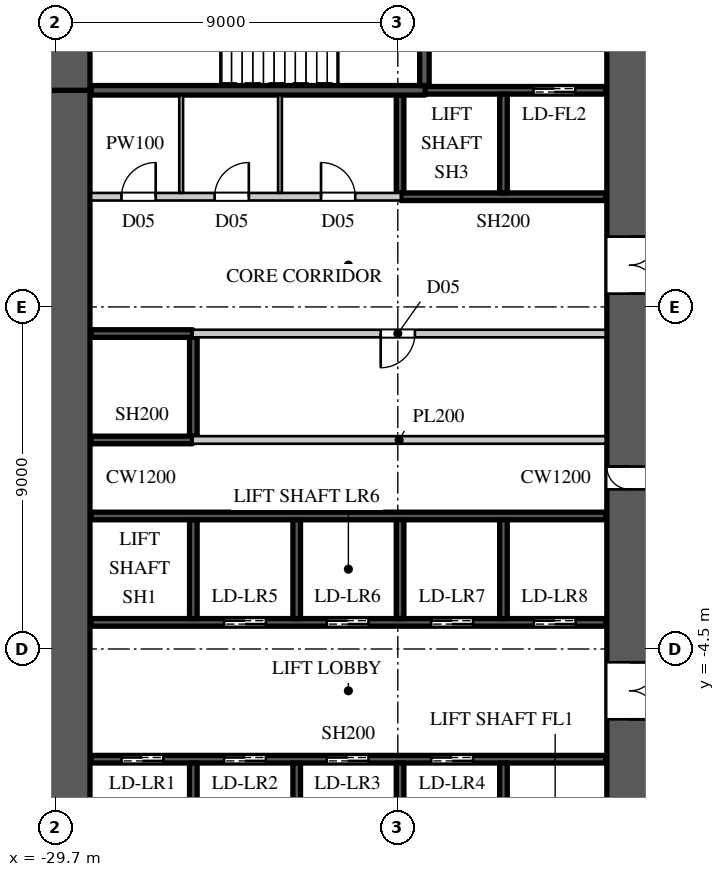
"""IFC4 building model, lengths in metres.
Left out: names, types, materials, properties, quantities, classifications, styles, units other than length and angle.
Written with IfcOpenShell. Run it as: python <this file> out.ifc"""

import sys

from ifc_helpers import new_model, si_unit, direction, frame, frame_2d, origin, place, context, subcontext, project, spatial, rectangle, extrude, element, fill, save


model = new_model("IFC4")
c1 = context("Model", 3, precision=1e-05, world=origin(), true_north=direction((0.0, 1.0)))
c2 = subcontext(c1, "Body", "Model", "MODEL_VIEW")
j1 = project(units=[si_unit("LENGTHUNIT", "METRE"), si_unit("PLANEANGLEUNIT", "RADIAN")], contexts=[c1])
p1 = place(None, origin())
s1 = spatial("IfcSite", under=j1, at=p1, CompositionType="ELEMENT")
p2 = place(p1, origin())
s2 = spatial("IfcBuilding", under=s1, at=p2, CompositionType="ELEMENT")
p3 = place(p2, frame((0.0, 0.0, 36.0)))
s3 = spatial("IfcBuildingStorey", under=s2, at=p3, CompositionType="ELEMENT", Elevation=36.0)
p4 = place(p3, frame((-14.6, -14.8, 0.0), z_axis=(0.0, 0.0, 1.0), x_axis=(0.0, 1.0, 0.0)))
e1 = element("IfcWall", 1, at=p4, inside=s3, PredefinedType="SHEAR", context=c2, shape_type="SweptSolid", body=[
    extrude(rectangle(XDim=29.6, YDim=1.2, at=frame_2d((14.8, 0.0))), origin(), (0.0, 0.0, 1.0), 8.0),
])
p5 = place(p4, frame((1.55, 0.0, 0.0)))
e2 = element("IfcOpeningElement", 2, at=p5, cuts=e1, PredefinedType="OPENING", context=c2, shape_type="SweptSolid", body=[
    extrude(rectangle(XDim=1.5, YDim=2.4, at=frame_2d((0.75, 1.2))), frame((0.0, 0.61, 0.0), z_axis=(0.0, -1.0, 0.0), x_axis=(1.0, 0.0, 0.0)), (0.0, 0.0, 1.0), 1.22),
])
p6 = place(p4, frame((26.55, 0.0, 0.0)))
e3 = element("IfcOpeningElement", 3, at=p6, cuts=e1, PredefinedType="OPENING", context=c2, shape_type="SweptSolid", body=[
    extrude(rectangle(XDim=1.5, YDim=2.4, at=frame_2d((0.75, 1.2))), frame((0.0, 0.61, 0.0), z_axis=(0.0, -1.0, 0.0), x_axis=(1.0, 0.0, 0.0)), (0.0, 0.0, 1.0), 1.22),
])
p7 = place(p4, frame((8.45, 0.0, 0.0)))
e4 = element("IfcOpeningElement", 4, at=p7, cuts=e1, PredefinedType="OPENING", context=c2, shape_type="SweptSolid", body=[
    extrude(rectangle(XDim=1.5, YDim=2.4, at=frame_2d((0.75, 1.2))), frame((0.0, 0.61, 0.0), z_axis=(0.0, -1.0, 0.0), x_axis=(1.0, 0.0, 0.0)), (0.0, 0.0, 1.0), 1.22),
])
p8 = place(p4, frame((19.65, 0.0, 0.0)))
e5 = element("IfcOpeningElement", 5, at=p8, cuts=e1, PredefinedType="OPENING", context=c2, shape_type="SweptSolid", body=[
    extrude(rectangle(XDim=1.5, YDim=2.4, at=frame_2d((0.75, 1.2))), frame((0.0, 0.61, 0.0), z_axis=(0.0, -1.0, 0.0), x_axis=(1.0, 0.0, 0.0)), (0.0, 0.0, 1.0), 1.22),
])
p9 = place(p4, frame((14.5, 0.0, 0.0)))
e6 = element("IfcOpeningElement", 6, at=p9, cuts=e1, PredefinedType="OPENING", context=c2, shape_type="SweptSolid", body=[
    extrude(rectangle(XDim=0.6, YDim=2.0, at=frame_2d((0.3, 1.0))), frame((0.0, 0.61, 0.0), z_axis=(0.0, -1.0, 0.0), x_axis=(1.0, 0.0, 0.0)), (0.0, 0.0, 1.0), 1.22),
])
p10 = place(p3, frame((-29.4, -10.2, 0.0), z_axis=(0.0, 0.0, 1.0), x_axis=(0.0, 1.0, 0.0)))
e7 = element("IfcWall", 7, at=p10, inside=s3, PredefinedType="SHEAR", context=c2, shape_type="SweptSolid", body=[
    extrude(rectangle(XDim=20.4, YDim=1.2, at=frame_2d((10.2, 0.0))), origin(), (0.0, 0.0, 1.0), 8.0),
])
p11 = place(p3, frame((-29.4, 10.2, 0.0), z_axis=(0.0, 0.0, 1.0), x_axis=(0.0, 1.0, 0.0)))
e8 = element("IfcWall", 8, at=p11, inside=s3, PredefinedType="SHEAR", context=c2, shape_type="SweptSolid", body=[
    extrude(rectangle(XDim=4.6, YDim=1.2, at=frame_2d((2.3, 0.0))), origin(), (0.0, 0.0, 1.0), 8.0),
])
p12 = place(p3, frame((-28.77, 7.4, 0.0), z_axis=(0.0, 0.0, 1.0), x_axis=(1.0, 0.0, 0.0)))
e9 = element("IfcWall", 9, at=p12, inside=s3, PredefinedType="PARTITIONING", context=c2, shape_type="SweptSolid", body=[
    extrude(rectangle(XDim=8.15, YDim=0.2, at=frame_2d((4.075, 0.0))), origin(), (0.0, 0.0, 1.0), 7.598),
])
p13 = place(p12, frame((0.8, 0.0, 0.0)))
e10 = element("IfcOpeningElement", 10, at=p13, cuts=e9, PredefinedType="OPENING", context=c2, shape_type="SweptSolid", body=[
    extrude(rectangle(XDim=0.9, YDim=2.2, at=frame_2d((0.45, 1.1))), frame((0.0, 0.11, 0.0), z_axis=(0.0, -1.0, 0.0), x_axis=(1.0, 0.0, 0.0)), (0.0, 0.0, 1.0), 0.22),
])
p14 = place(p12, frame((3.25, 0.0, 0.0)))
e11 = element("IfcOpeningElement", 11, at=p14, cuts=e9, PredefinedType="OPENING", context=c2, shape_type="SweptSolid", body=[
    extrude(rectangle(XDim=0.9, YDim=2.2, at=frame_2d((0.45, 1.1))), frame((0.0, 0.11, 0.0), z_axis=(0.0, -1.0, 0.0), x_axis=(1.0, 0.0, 0.0)), (0.0, 0.0, 1.0), 0.22),
])
p15 = place(p12, frame((6.05, 0.0, 0.0)))
e12 = element("IfcOpeningElement", 12, at=p15, cuts=e9, PredefinedType="OPENING", context=c2, shape_type="SweptSolid", body=[
    extrude(rectangle(XDim=0.9, YDim=2.2, at=frame_2d((0.45, 1.1))), frame((0.0, 0.11, 0.0), z_axis=(0.0, -1.0, 0.0), x_axis=(1.0, 0.0, 0.0)), (0.0, 0.0, 1.0), 0.22),
])
p16 = place(p3, frame((-26.1, 3.8, 0.0), z_axis=(0.0, 0.0, 1.0), x_axis=(1.0, 0.0, 0.0)))
e13 = element("IfcWall", 13, at=p16, inside=s3, PredefinedType="PARTITIONING", context=c2, shape_type="SweptSolid", body=[
    extrude(rectangle(XDim=10.87, YDim=0.2, at=frame_2d((5.435, 0.0))), origin(), (0.0, 0.0, 1.0), 7.598),
])
p17 = place(p16, frame((4.95, 0.0, 0.0)))
e14 = element("IfcOpeningElement", 14, at=p17, cuts=e13, PredefinedType="OPENING", context=c2, shape_type="SweptSolid", body=[
    extrude(rectangle(XDim=0.9, YDim=2.2, at=frame_2d((0.45, 1.1))), frame((0.0, 0.11, 0.0), z_axis=(0.0, -1.0, 0.0), x_axis=(1.0, 0.0, 0.0)), (0.0, 0.0, 1.0), 0.22),
])
p18 = place(p3, frame((-26.1, 1.0, 0.0), z_axis=(0.0, 0.0, 1.0), x_axis=(1.0, 0.0, 0.0)))
e15 = element("IfcWall", 15, at=p18, inside=s3, PredefinedType="PARTITIONING", context=c2, shape_type="SweptSolid", body=[
    extrude(rectangle(XDim=10.87, YDim=0.2, at=frame_2d((5.435, 0.0))), origin(), (0.0, 0.0, 1.0), 7.598),
])
p19 = place(p3, frame((-28.77, -7.4, 0.0), z_axis=(0.0, 0.0, 1.0), x_axis=(1.0, 0.0, 0.0)))
e16 = element("IfcWall", 16, at=p19, inside=s3, PredefinedType="SHEAR", context=c2, shape_type="SweptSolid", body=[
    extrude(rectangle(XDim=13.54, YDim=0.2, at=frame_2d((6.77, 0.0))), origin(), (0.0, 0.0, 1.0), 7.598),
])
p20 = place(p19, frame((0.8, 0.0, 0.0)))
e17 = element("IfcOpeningElement", 17, at=p20, cuts=e16, PredefinedType="OPENING", context=c2, shape_type="SweptSolid", body=[
    extrude(rectangle(XDim=1.1, YDim=2.2, at=frame_2d((0.55, 1.1))), frame((0.0, 0.11, 0.0), z_axis=(0.0, -1.0, 0.0), x_axis=(1.0, 0.0, 0.0)), (0.0, 0.0, 1.0), 0.22),
])
p21 = place(p19, frame((3.5, 0.0, 0.0)))
e18 = element("IfcOpeningElement", 18, at=p21, cuts=e16, PredefinedType="OPENING", context=c2, shape_type="SweptSolid", body=[
    extrude(rectangle(XDim=1.1, YDim=2.2, at=frame_2d((0.55, 1.1))), frame((0.0, 0.11, 0.0), z_axis=(0.0, -1.0, 0.0), x_axis=(1.0, 0.0, 0.0)), (0.0, 0.0, 1.0), 0.22),
])
p22 = place(p19, frame((6.2, 0.0, 0.0)))
e19 = element("IfcOpeningElement", 19, at=p22, cuts=e16, PredefinedType="OPENING", context=c2, shape_type="SweptSolid", body=[
    extrude(rectangle(XDim=1.1, YDim=2.2, at=frame_2d((0.55, 1.1))), frame((0.0, 0.11, 0.0), z_axis=(0.0, -1.0, 0.0), x_axis=(1.0, 0.0, 0.0)), (0.0, 0.0, 1.0), 0.22),
])
p23 = place(p19, frame((8.95, 0.0, 0.0)))
e20 = element("IfcOpeningElement", 20, at=p23, cuts=e16, PredefinedType="OPENING", context=c2, shape_type="SweptSolid", body=[
    extrude(rectangle(XDim=1.1, YDim=2.2, at=frame_2d((0.55, 1.1))), frame((0.0, 0.11, 0.0), z_axis=(0.0, -1.0, 0.0), x_axis=(1.0, 0.0, 0.0)), (0.0, 0.0, 1.0), 0.22),
])
p24 = place(p3, frame((-28.77, -3.8, 0.0), z_axis=(0.0, 0.0, 1.0), x_axis=(1.0, 0.0, 0.0)))
e21 = element("IfcWall", 21, at=p24, inside=s3, PredefinedType="SHEAR", context=c2, shape_type="SweptSolid", body=[
    extrude(rectangle(XDim=13.54, YDim=0.2, at=frame_2d((6.77, 0.0))), origin(), (0.0, 0.0, 1.0), 7.598),
])
p25 = place(p24, frame((3.5, 0.0, 0.0)))
e22 = element("IfcOpeningElement", 22, at=p25, cuts=e21, PredefinedType="OPENING", context=c2, shape_type="SweptSolid", body=[
    extrude(rectangle(XDim=1.1, YDim=2.2, at=frame_2d((0.55, 1.1))), frame((0.0, 0.11, 0.0), z_axis=(0.0, -1.0, 0.0), x_axis=(1.0, 0.0, 0.0)), (0.0, 0.0, 1.0), 0.22),
])
p26 = place(p24, frame((6.2, 0.0, 0.0)))
e23 = element("IfcOpeningElement", 23, at=p26, cuts=e21, PredefinedType="OPENING", context=c2, shape_type="SweptSolid", body=[
    extrude(rectangle(XDim=1.1, YDim=2.2, at=frame_2d((0.55, 1.1))), frame((0.0, 0.11, 0.0), z_axis=(0.0, -1.0, 0.0), x_axis=(1.0, 0.0, 0.0)), (0.0, 0.0, 1.0), 0.22),
])
p27 = place(p24, frame((8.95, 0.0, 0.0)))
e24 = element("IfcOpeningElement", 24, at=p27, cuts=e21, PredefinedType="OPENING", context=c2, shape_type="SweptSolid", body=[
    extrude(rectangle(XDim=1.1, YDim=2.2, at=frame_2d((0.55, 1.1))), frame((0.0, 0.11, 0.0), z_axis=(0.0, -1.0, 0.0), x_axis=(1.0, 0.0, 0.0)), (0.0, 0.0, 1.0), 0.22),
])
p28 = place(p24, frame((11.65, 0.0, 0.0)))
e25 = element("IfcOpeningElement", 25, at=p28, cuts=e21, PredefinedType="OPENING", context=c2, shape_type="SweptSolid", body=[
    extrude(rectangle(XDim=1.1, YDim=2.2, at=frame_2d((0.55, 1.1))), frame((0.0, 0.11, 0.0), z_axis=(0.0, -1.0, 0.0), x_axis=(1.0, 0.0, 0.0)), (0.0, 0.0, 1.0), 0.22),
])
p29 = place(p3, frame((-28.77, -1.0, 0.0), z_axis=(0.0, 0.0, 1.0), x_axis=(1.0, 0.0, 0.0)))
e26 = element("IfcWall", 26, at=p29, inside=s3, PredefinedType="SHEAR", context=c2, shape_type="SweptSolid", body=[
    extrude(rectangle(XDim=13.54, YDim=0.2, at=frame_2d((6.77, 0.0))), origin(), (0.0, 0.0, 1.0), 7.598),
])
for number, where, z_axis, x_axis in (
    (27, (-28.77, 1.0, 0.0), (0.0, 0.0, 1.0), (1.0, 0.0, 0.0)),
    (28, (-28.77, 3.8, 0.0), (0.0, 0.0, 1.0), (1.0, 0.0, 0.0)),
):
    element("IfcWall", number, at=place(p3, frame(where, z_axis=z_axis, x_axis=x_axis)), inside=s3, PredefinedType="SHEAR", context=c2, shape_type="SweptSolid", body=[
        extrude(rectangle(XDim=2.67, YDim=0.2, at=frame_2d((1.335, 0.0))), origin(), (0.0, 0.0, 1.0), 7.598),
    ])
p30 = place(p3, frame((-26.08, -10.075, 0.0), z_axis=(0.0, 0.0, 1.0), x_axis=(0.0, 1.0, 0.0)))
e29 = element("IfcWall", 29, at=p30, inside=s3, PredefinedType="SHEAR", context=c2, shape_type="SweptSolid", body=[
    extrude(rectangle(XDim=2.575, YDim=0.2, at=frame_2d((1.288, 0.0))), origin(), (0.0, 0.0, 1.0), 8.0),
])
p31 = place(p3, frame((-26.08, -3.7, 0.0), z_axis=(0.0, 0.0, 1.0), x_axis=(0.0, 1.0, 0.0)))
e30 = element("IfcWall", 30, at=p31, inside=s3, PredefinedType="SHEAR", context=c2, shape_type="SweptSolid", body=[
    extrude(rectangle(XDim=2.6, YDim=0.2, at=frame_2d((1.3, 0.0))), origin(), (0.0, 0.0, 1.0), 8.0),
])
p32 = place(p3, frame((-26.08, 1.1, 0.0), z_axis=(0.0, 0.0, 1.0), x_axis=(0.0, 1.0, 0.0)))
e31 = element("IfcWall", 31, at=p32, inside=s3, PredefinedType="SHEAR", context=c2, shape_type="SweptSolid", body=[
    extrude(rectangle(XDim=2.6, YDim=0.2, at=frame_2d((1.3, 0.0))), origin(), (0.0, 0.0, 1.0), 7.598),
])
p33 = place(p3, frame((-23.36, -10.075, 0.0), z_axis=(0.0, 0.0, 1.0), x_axis=(0.0, 1.0, 0.0)))
e32 = element("IfcWall", 32, at=p33, inside=s3, PredefinedType="SHEAR", context=c2, shape_type="SweptSolid", body=[
    extrude(rectangle(XDim=2.575, YDim=0.2, at=frame_2d((1.288, 0.0))), origin(), (0.0, 0.0, 1.0), 8.0),
])
p34 = place(p3, frame((-23.36, -3.7, 0.0), z_axis=(0.0, 0.0, 1.0), x_axis=(0.0, 1.0, 0.0)))
e33 = element("IfcWall", 33, at=p34, inside=s3, PredefinedType="SHEAR", context=c2, shape_type="SweptSolid", body=[
    extrude(rectangle(XDim=2.6, YDim=0.2, at=frame_2d((1.3, 0.0))), origin(), (0.0, 0.0, 1.0), 8.0),
])
p35 = place(p3, frame((-20.64, -10.075, 0.0), z_axis=(0.0, 0.0, 1.0), x_axis=(0.0, 1.0, 0.0)))
e34 = element("IfcWall", 34, at=p35, inside=s3, PredefinedType="SHEAR", context=c2, shape_type="SweptSolid", body=[
    extrude(rectangle(XDim=2.575, YDim=0.2, at=frame_2d((1.288, 0.0))), origin(), (0.0, 0.0, 1.0), 8.0),
])
p36 = place(p3, frame((-20.64, -3.7, 0.0), z_axis=(0.0, 0.0, 1.0), x_axis=(0.0, 1.0, 0.0)))
e35 = element("IfcWall", 35, at=p36, inside=s3, PredefinedType="SHEAR", context=c2, shape_type="SweptSolid", body=[
    extrude(rectangle(XDim=2.6, YDim=0.2, at=frame_2d((1.3, 0.0))), origin(), (0.0, 0.0, 1.0), 8.0),
])
p37 = place(p3, frame((-20.64, 7.5, 0.0), z_axis=(0.0, 0.0, 1.0), x_axis=(0.0, 1.0, 0.0)))
e36 = element("IfcWall", 36, at=p37, inside=s3, PredefinedType="SHEAR", context=c2, shape_type="SweptSolid", body=[
    extrude(rectangle(XDim=2.575, YDim=0.2, at=frame_2d((1.288, 0.0))), origin(), (0.0, 0.0, 1.0), 7.598),
])
p38 = place(p3, frame((-20.62, 7.4, 0.0), z_axis=(0.0, 0.0, 1.0), x_axis=(1.0, 0.0, 0.0)))
e37 = element("IfcWall", 37, at=p38, inside=s3, PredefinedType="SHEAR", context=c2, shape_type="SweptSolid", body=[
    extrude(rectangle(XDim=5.39, YDim=0.2, at=frame_2d((2.695, 0.0))), origin(), (0.0, 0.0, 1.0), 7.598),
])
p39 = place(p3, frame((-19.98, 10.2, 0.0), z_axis=(0.0, 0.0, 1.0), x_axis=(1.0, 0.0, 0.0)))
e38 = element("IfcWall", 38, at=p39, inside=s3, PredefinedType="SHEAR", context=c2, shape_type="SweptSolid", body=[
    extrude(rectangle(XDim=4.75, YDim=0.2, at=frame_2d((2.375, 0.0))), origin(), (0.0, 0.0, 1.0), 7.598),
])
p40 = place(p39, frame((2.85, 0.0, 0.0)))
e39 = element("IfcOpeningElement", 39, at=p40, cuts=e38, PredefinedType="OPENING", context=c2, shape_type="SweptSolid", body=[
    extrude(rectangle(XDim=1.1, YDim=2.2, at=frame_2d((0.55, 1.1))), frame((0.0, 0.11, 0.0), z_axis=(0.0, -1.0, 0.0), x_axis=(1.0, 0.0, 0.0)), (0.0, 0.0, 1.0), 0.22),
])
p41 = place(p3, frame((-17.92, -10.1, 0.0), z_axis=(0.0, 0.0, 1.0), x_axis=(0.0, 1.0, 0.0)))
e40 = element("IfcWall", 40, at=p41, inside=s3, PredefinedType="SHEAR", context=c2, shape_type="SweptSolid", body=[
    extrude(rectangle(XDim=2.6, YDim=0.2, at=frame_2d((1.3, 0.0))), origin(), (0.0, 0.0, 1.0), 8.0),
])
p42 = place(p3, frame((-17.92, -3.7, 0.0), z_axis=(0.0, 0.0, 1.0), x_axis=(0.0, 1.0, 0.0)))
e41 = element("IfcWall", 41, at=p42, inside=s3, PredefinedType="SHEAR", context=c2, shape_type="SweptSolid", body=[
    extrude(rectangle(XDim=2.6, YDim=0.2, at=frame_2d((1.3, 0.0))), origin(), (0.0, 0.0, 1.0), 8.0),
])
p43 = place(p3, frame((-17.92, 7.5, 0.0), z_axis=(0.0, 0.0, 1.0), x_axis=(0.0, 1.0, 0.0)))
e42 = element("IfcWall", 42, at=p43, inside=s3, PredefinedType="SHEAR", context=c2, shape_type="SweptSolid", body=[
    extrude(rectangle(XDim=2.6, YDim=0.2, at=frame_2d((1.3, 0.0))), origin(), (0.0, 0.0, 1.0), 8.0),
])
p44 = place(p3, frame((-28.77, 10.2, 0.0), z_axis=(0.0, 0.0, 1.0), x_axis=(1.0, 0.0, 0.0)))
e43 = element("IfcWall", 43, at=p44, inside=s3, PredefinedType="SHEAR", context=c2, shape_type="SweptSolid", body=[
    extrude(rectangle(XDim=8.79, YDim=0.25, at=frame_2d((4.395, 0.0))), origin(), (0.0, 0.0, 1.0), 7.598),
])
p45 = place(p3, frame((-20.0, 10.325, 0.0), z_axis=(0.0, 0.0, 1.0), x_axis=(0.0, 1.0, 0.0)))
e44 = element("IfcWall", 44, at=p45, inside=s3, PredefinedType="SHEAR", context=c2, shape_type="SweptSolid", body=[
    extrude(rectangle(XDim=4.445, YDim=0.25, at=frame_2d((2.223, 0.0))), origin(), (0.0, 0.0, 1.0), 7.598),
])
p46 = place(p45, frame((1.65, 0.0, 0.0)))
e45 = element("IfcOpeningElement", 45, at=p46, cuts=e44, PredefinedType="OPENING", context=c2, shape_type="SweptSolid", body=[
    extrude(rectangle(XDim=1.1, YDim=2.2, at=frame_2d((0.55, 1.1))), frame((0.0, 0.135, 0.0), z_axis=(0.0, -1.0, 0.0), x_axis=(1.0, 0.0, 0.0)), (0.0, 0.0, 1.0), 0.27),
])
for number, where, z_axis, x_axis in (
    (46, (-26.4, 7.5, 0.0), (0.0, 0.0, 1.0), (0.0, 1.0, 0.0)),
    (47, (-23.8, 7.5, 0.0), (0.0, 0.0, 1.0), (0.0, 1.0, 0.0)),
):
    element("IfcWall", number, at=place(p3, frame(where, z_axis=z_axis, x_axis=x_axis)), inside=s3, PredefinedType="PARTITIONING", context=c2, shape_type="SweptSolid", body=[
        extrude(rectangle(XDim=2.575, YDim=0.1, at=frame_2d((1.288, 0.0))), origin(), (0.0, 0.0, 1.0), 7.598),
    ])
p47 = place(p17, origin())
e48 = element("IfcDoor", 48, at=p47, inside=s3, OperationType="SINGLE_SWING_RIGHT", PredefinedType="DOOR", context=c2, shape_type="SweptSolid", body=[
    extrude(rectangle(XDim=0.9, YDim=2.2, at=frame_2d((0.45, 1.1))), frame((0.0, 0.025, 0.0), z_axis=(0.0, -1.0, 0.0), x_axis=(1.0, 0.0, 0.0)), (0.0, 0.0, 1.0), 0.05),
])
fill(e14, e48)
p48 = place(p13, origin())
e49 = element("IfcDoor", 49, at=p48, inside=s3, OperationType="SINGLE_SWING_RIGHT", PredefinedType="DOOR", context=c2, shape_type="SweptSolid", body=[
    extrude(rectangle(XDim=0.9, YDim=2.2, at=frame_2d((0.45, 1.1))), frame((0.0, 0.025, 0.0), z_axis=(0.0, -1.0, 0.0), x_axis=(1.0, 0.0, 0.0)), (0.0, 0.0, 1.0), 0.05),
])
fill(e10, e49)
p49 = place(p14, origin())
e50 = element("IfcDoor", 50, at=p49, inside=s3, OperationType="SINGLE_SWING_RIGHT", PredefinedType="DOOR", context=c2, shape_type="SweptSolid", body=[
    extrude(rectangle(XDim=0.9, YDim=2.2, at=frame_2d((0.45, 1.1))), frame((0.0, 0.025, 0.0), z_axis=(0.0, -1.0, 0.0), x_axis=(1.0, 0.0, 0.0)), (0.0, 0.0, 1.0), 0.05),
])
fill(e11, e50)
p50 = place(p15, origin())
e51 = element("IfcDoor", 51, at=p50, inside=s3, OperationType="SINGLE_SWING_LEFT", PredefinedType="DOOR", context=c2, shape_type="SweptSolid", body=[
    extrude(rectangle(XDim=0.9, YDim=2.2, at=frame_2d((0.45, 1.1))), frame((0.0, 0.025, 0.0), z_axis=(0.0, -1.0, 0.0), x_axis=(1.0, 0.0, 0.0)), (0.0, 0.0, 1.0), 0.05),
])
fill(e12, e51)
p51 = place(p20, origin())
e52 = element("IfcDoor", 52, at=p51, inside=s3, OperationType="DOUBLE_DOOR_SLIDING", PredefinedType="DOOR", context=c2, shape_type="SweptSolid", body=[
    extrude(rectangle(XDim=1.1, YDim=2.2, at=frame_2d((0.55, 1.1))), frame((0.0, 0.025, 0.0), z_axis=(0.0, -1.0, 0.0), x_axis=(1.0, 0.0, 0.0)), (0.0, 0.0, 1.0), 0.05),
])
fill(e17, e52)
p52 = place(p21, origin())
e53 = element("IfcDoor", 53, at=p52, inside=s3, OperationType="DOUBLE_DOOR_SLIDING", PredefinedType="DOOR", context=c2, shape_type="SweptSolid", body=[
    extrude(rectangle(XDim=1.1, YDim=2.2, at=frame_2d((0.55, 1.1))), frame((0.0, 0.025, 0.0), z_axis=(0.0, -1.0, 0.0), x_axis=(1.0, 0.0, 0.0)), (0.0, 0.0, 1.0), 0.05),
])
fill(e18, e53)
p53 = place(p22, origin())
e54 = element("IfcDoor", 54, at=p53, inside=s3, OperationType="DOUBLE_DOOR_SLIDING", PredefinedType="DOOR", context=c2, shape_type="SweptSolid", body=[
    extrude(rectangle(XDim=1.1, YDim=2.2, at=frame_2d((0.55, 1.1))), frame((0.0, 0.025, 0.0), z_axis=(0.0, -1.0, 0.0), x_axis=(1.0, 0.0, 0.0)), (0.0, 0.0, 1.0), 0.05),
])
fill(e19, e54)
p54 = place(p23, origin())
e55 = element("IfcDoor", 55, at=p54, inside=s3, OperationType="DOUBLE_DOOR_SLIDING", PredefinedType="DOOR", context=c2, shape_type="SweptSolid", body=[
    extrude(rectangle(XDim=1.1, YDim=2.2, at=frame_2d((0.55, 1.1))), frame((0.0, 0.025, 0.0), z_axis=(0.0, -1.0, 0.0), x_axis=(1.0, 0.0, 0.0)), (0.0, 0.0, 1.0), 0.05),
])
fill(e20, e55)
p55 = place(p25, origin())
e56 = element("IfcDoor", 56, at=p55, inside=s3, OperationType="DOUBLE_DOOR_SLIDING", PredefinedType="DOOR", context=c2, shape_type="SweptSolid", body=[
    extrude(rectangle(XDim=1.1, YDim=2.2, at=frame_2d((0.55, 1.1))), frame((0.0, 0.025, 0.0), z_axis=(0.0, -1.0, 0.0), x_axis=(1.0, 0.0, 0.0)), (0.0, 0.0, 1.0), 0.05),
])
fill(e22, e56)
p56 = place(p26, origin())
e57 = element("IfcDoor", 57, at=p56, inside=s3, OperationType="DOUBLE_DOOR_SLIDING", PredefinedType="DOOR", context=c2, shape_type="SweptSolid", body=[
    extrude(rectangle(XDim=1.1, YDim=2.2, at=frame_2d((0.55, 1.1))), frame((0.0, 0.025, 0.0), z_axis=(0.0, -1.0, 0.0), x_axis=(1.0, 0.0, 0.0)), (0.0, 0.0, 1.0), 0.05),
])
fill(e23, e57)
p57 = place(p27, origin())
e58 = element("IfcDoor", 58, at=p57, inside=s3, OperationType="DOUBLE_DOOR_SLIDING", PredefinedType="DOOR", context=c2, shape_type="SweptSolid", body=[
    extrude(rectangle(XDim=1.1, YDim=2.2, at=frame_2d((0.55, 1.1))), frame((0.0, 0.025, 0.0), z_axis=(0.0, -1.0, 0.0), x_axis=(1.0, 0.0, 0.0)), (0.0, 0.0, 1.0), 0.05),
])
fill(e24, e58)
p58 = place(p28, origin())
e59 = element("IfcDoor", 59, at=p58, inside=s3, OperationType="DOUBLE_DOOR_SLIDING", PredefinedType="DOOR", context=c2, shape_type="SweptSolid", body=[
    extrude(rectangle(XDim=1.1, YDim=2.2, at=frame_2d((0.55, 1.1))), frame((0.0, 0.025, 0.0), z_axis=(0.0, -1.0, 0.0), x_axis=(1.0, 0.0, 0.0)), (0.0, 0.0, 1.0), 0.05),
])
fill(e25, e59)
p59 = place(p40, origin())
e60 = element("IfcDoor", 60, at=p59, inside=s3, OperationType="DOUBLE_DOOR_SLIDING", PredefinedType="DOOR", context=c2, shape_type="SweptSolid", body=[
    extrude(rectangle(XDim=1.1, YDim=2.2, at=frame_2d((0.55, 1.1))), frame((0.0, 0.025, 0.0), z_axis=(0.0, -1.0, 0.0), x_axis=(1.0, 0.0, 0.0)), (0.0, 0.0, 1.0), 0.05),
])
fill(e39, e60)
p60 = place(p7, origin())
e61 = element("IfcDoor", 61, at=p60, inside=s3, OperationType="DOUBLE_DOOR_SINGLE_SWING", PredefinedType="DOOR", context=c2, shape_type="SweptSolid", body=[
    extrude(rectangle(XDim=1.5, YDim=2.4, at=frame_2d((0.75, 1.2))), frame((0.0, 0.025, 0.0), z_axis=(0.0, -1.0, 0.0), x_axis=(1.0, 0.0, 0.0)), (0.0, 0.0, 1.0), 0.05),
])
fill(e4, e61)
p61 = place(p8, origin())
e62 = element("IfcDoor", 62, at=p61, inside=s3, OperationType="DOUBLE_DOOR_SINGLE_SWING", PredefinedType="DOOR", context=c2, shape_type="SweptSolid", body=[
    extrude(rectangle(XDim=1.5, YDim=2.4, at=frame_2d((0.75, 1.2))), frame((0.0, 0.025, 0.0), z_axis=(0.0, -1.0, 0.0), x_axis=(1.0, 0.0, 0.0)), (0.0, 0.0, 1.0), 0.05),
])
fill(e5, e62)
p62 = place(p9, origin())
e63 = element("IfcDoor", 63, at=p62, inside=s3, OperationType="SINGLE_SWING_RIGHT", PredefinedType="DOOR", context=c2, shape_type="SweptSolid", body=[
    extrude(rectangle(XDim=0.6, YDim=2.0, at=frame_2d((0.3, 1.0))), frame((0.0, 0.025, 0.0), z_axis=(0.0, -1.0, 0.0), x_axis=(1.0, 0.0, 0.0)), (0.0, 0.0, 1.0), 0.05),
])
fill(e6, e63)
save(model, sys.argv[1])
